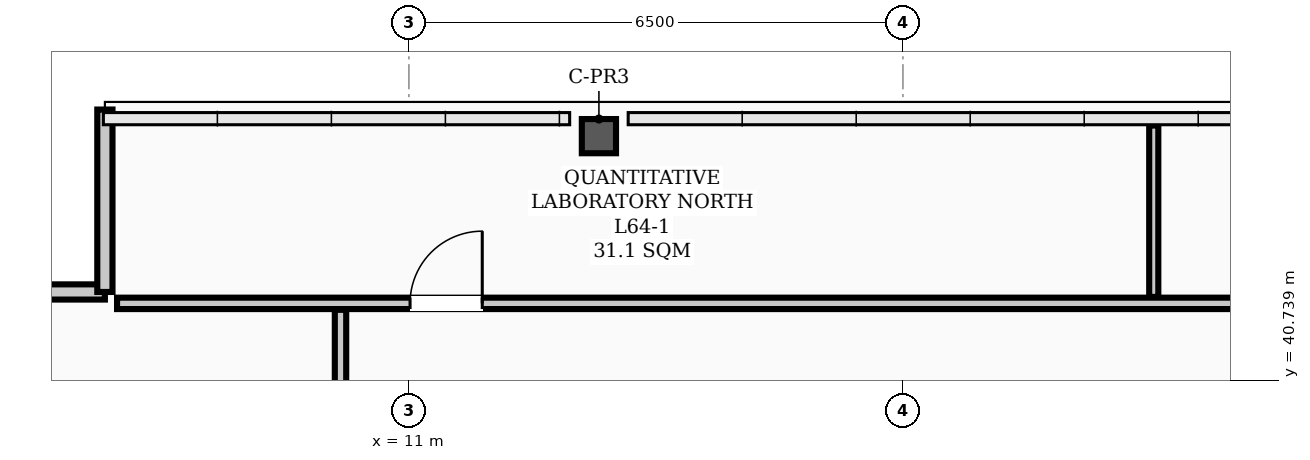
"""IFC4 building model, lengths in metres.
Left out: names, types, materials, properties, quantities, classifications, styles, units other than length and angle.
Written with IfcOpenShell. Run it as: python <this file> out.ifc"""

import sys

from ifc_helpers import new_model, si_unit, direction, frame, frame_2d, origin, origin_2d, place, context, subcontext, project, spatial, rectangle, hollow_rectangle, extrude, element, fill, save


model = new_model("IFC4")
c1 = context("Model", 3, precision=1e-05, world=origin(), true_north=direction((0.0, 1.0)))
c2 = subcontext(c1, "Body", "Model", "MODEL_VIEW")
j1 = project(units=[si_unit("LENGTHUNIT", "METRE"), si_unit("PLANEANGLEUNIT", "RADIAN")], contexts=[c1])
p1 = place(None, origin())
s1 = spatial("IfcSite", under=j1, at=p1, CompositionType="ELEMENT")
p2 = place(p1, origin())
s2 = spatial("IfcBuilding", under=s1, at=p2, CompositionType="ELEMENT")
p3 = place(p2, frame((0.0, 0.0, 257.9)))
s3 = spatial("IfcBuildingStorey", under=s2, at=p3, CompositionType="ELEMENT", Elevation=257.9)
p4 = place(p3, frame((13.5, 43.95, 0.0), z_axis=(0.0, 0.0, 1.0), x_axis=(1.0, 0.0, 0.0)))
e1 = element("IfcColumn", 1, at=p4, inside=s3, PredefinedType="COLUMN", context=c2, shape_type="SweptSolid", body=[
    extrude(hollow_rectangle(XDim=0.45, YDim=0.45, WallThickness=0.022, InnerFilletRadius=0.022, OuterFilletRadius=0.044, at=origin_2d()), origin(), (0.0, 0.0, 1.0), 3.9),
])
p5 = place(p3, frame((4.6, 41.9, 0.0), z_axis=(0.0, 0.0, 1.0), x_axis=(1.0, 0.0, 0.0)))
e2 = element("IfcWall", 2, at=p5, inside=s3, PredefinedType="PARAPET", context=c2, shape_type="SweptSolid", body=[
    extrude(rectangle(XDim=2.4, YDim=0.2, at=frame_2d((1.2, 0.0))), origin(), (0.0, 0.0, 1.0), 1.2),
])
p6 = place(p3, frame((7.0, 41.9, 0.0), z_axis=(0.0, 0.0, 1.0), x_axis=(0.0, 1.0, 0.0)))
e3 = element("IfcWall", 3, at=p6, inside=s3, PredefinedType="PARAPET", context=c2, shape_type="SweptSolid", body=[
    extrude(rectangle(XDim=2.4, YDim=0.2, at=frame_2d((1.2, 0.0))), origin(), (0.0, 0.0, 1.0), 1.2),
])
p7 = place(p3, frame((7.16, 41.75, 0.0), z_axis=(0.0, 0.0, 1.0), x_axis=(1.0, 0.0, 0.0)))
e4 = element("IfcWall", 4, at=p7, inside=s3, PredefinedType="PARTITIONING", context=c2, shape_type="SweptSolid", body=[
    extrude(rectangle(XDim=36.18, YDim=0.15, at=frame_2d((18.09, 0.0))), origin(), (0.0, 0.0, 1.0), 3.2),
])
p8 = place(p7, frame((3.855, 0.0, 0.0)))
e5 = element("IfcOpeningElement", 5, at=p8, cuts=e4, PredefinedType="OPENING", context=c2, shape_type="SweptSolid", body=[
    extrude(rectangle(XDim=0.95, YDim=2.08, at=frame_2d((0.475, 1.04))), frame((0.0, 0.085, 0.0), z_axis=(0.0, -1.0, 0.0), x_axis=(1.0, 0.0, 0.0)), (0.0, 0.0, 1.0), 0.17),
])
p9 = place(p7, frame((18.665, 0.0, 0.0)))
e6 = element("IfcOpeningElement", 6, at=p9, cuts=e4, PredefinedType="OPENING", context=c2, shape_type="SweptSolid", body=[
    extrude(rectangle(XDim=0.95, YDim=2.08, at=frame_2d((0.475, 1.04))), frame((0.0, 0.085, 0.0), z_axis=(0.0, -1.0, 0.0), x_axis=(1.0, 0.0, 0.0)), (0.0, 0.0, 1.0), 0.17),
])
p10 = place(p7, frame((26.765, 0.0, 0.0)))
e7 = element("IfcOpeningElement", 7, at=p10, cuts=e4, PredefinedType="OPENING", context=c2, shape_type="SweptSolid", body=[
    extrude(rectangle(XDim=0.95, YDim=2.08, at=frame_2d((0.475, 1.04))), frame((0.0, 0.085, 0.0), z_axis=(0.0, -1.0, 0.0), x_axis=(1.0, 0.0, 0.0)), (0.0, 0.0, 1.0), 0.17),
])
p11 = place(p7, frame((33.765, 0.0, 0.0)))
e8 = element("IfcOpeningElement", 8, at=p11, cuts=e4, PredefinedType="OPENING", context=c2, shape_type="SweptSolid", body=[
    extrude(rectangle(XDim=0.95, YDim=2.08, at=frame_2d((0.475, 1.04))), frame((0.0, 0.085, 0.0), z_axis=(0.0, -1.0, 0.0), x_axis=(1.0, 0.0, 0.0)), (0.0, 0.0, 1.0), 0.17),
])
p12 = place(p3, frame((10.1, 23.785, 0.0), z_axis=(0.0, 0.0, 1.0), x_axis=(0.0, 1.0, 0.0)))
e9 = element("IfcWall", 9, at=p12, inside=s3, PredefinedType="PARTITIONING", context=c2, shape_type="SweptSolid", body=[
    extrude(rectangle(XDim=17.88, YDim=0.15, at=frame_2d((8.94, 0.0))), origin(), (0.0, 0.0, 1.0), 3.1),
])
p13 = place(p12, frame((0.64, 0.0, 0.0)))
e10 = element("IfcOpeningElement", 10, at=p13, cuts=e9, PredefinedType="OPENING", context=c2, shape_type="SweptSolid", body=[
    extrude(rectangle(XDim=0.95, YDim=2.08, at=frame_2d((0.475, 1.04))), frame((0.0, 0.085, 0.0), z_axis=(0.0, -1.0, 0.0), x_axis=(1.0, 0.0, 0.0)), (0.0, 0.0, 1.0), 0.17),
])
p14 = place(p12, frame((13.015, 0.0, 0.0)))
e11 = element("IfcOpeningElement", 11, at=p14, cuts=e9, PredefinedType="OPENING", context=c2, shape_type="SweptSolid", body=[
    extrude(rectangle(XDim=0.95, YDim=2.08, at=frame_2d((0.475, 1.04))), frame((0.0, 0.085, 0.0), z_axis=(0.0, -1.0, 0.0), x_axis=(1.0, 0.0, 0.0)), (0.0, 0.0, 1.0), 0.17),
])
p15 = place(p3, frame((20.8, 41.835, 0.0), z_axis=(0.0, 0.0, 1.0), x_axis=(0.0, 1.0, 0.0)))
e12 = element("IfcWall", 12, at=p15, inside=s3, PredefinedType="PARTITIONING", context=c2, shape_type="SweptSolid", body=[
    extrude(rectangle(XDim=2.255, YDim=0.12, at=frame_2d((1.127, 0.0))), origin(), (0.0, 0.0, 1.0), 3.212),
])
p16 = place(p8, origin())
e13 = element("IfcDoor", 13, at=p16, inside=s3, OperationType="SINGLE_SWING_RIGHT", PredefinedType="DOOR", context=c2, shape_type="SweptSolid", body=[
    extrude(rectangle(XDim=0.95, YDim=2.08, at=frame_2d((0.475, 1.04))), frame((0.0, 0.025, 0.0), z_axis=(0.0, -1.0, 0.0), x_axis=(1.0, 0.0, 0.0)), (0.0, 0.0, 1.0), 0.05),
])
fill(e5, e13)
save(model, sys.argv[1])
